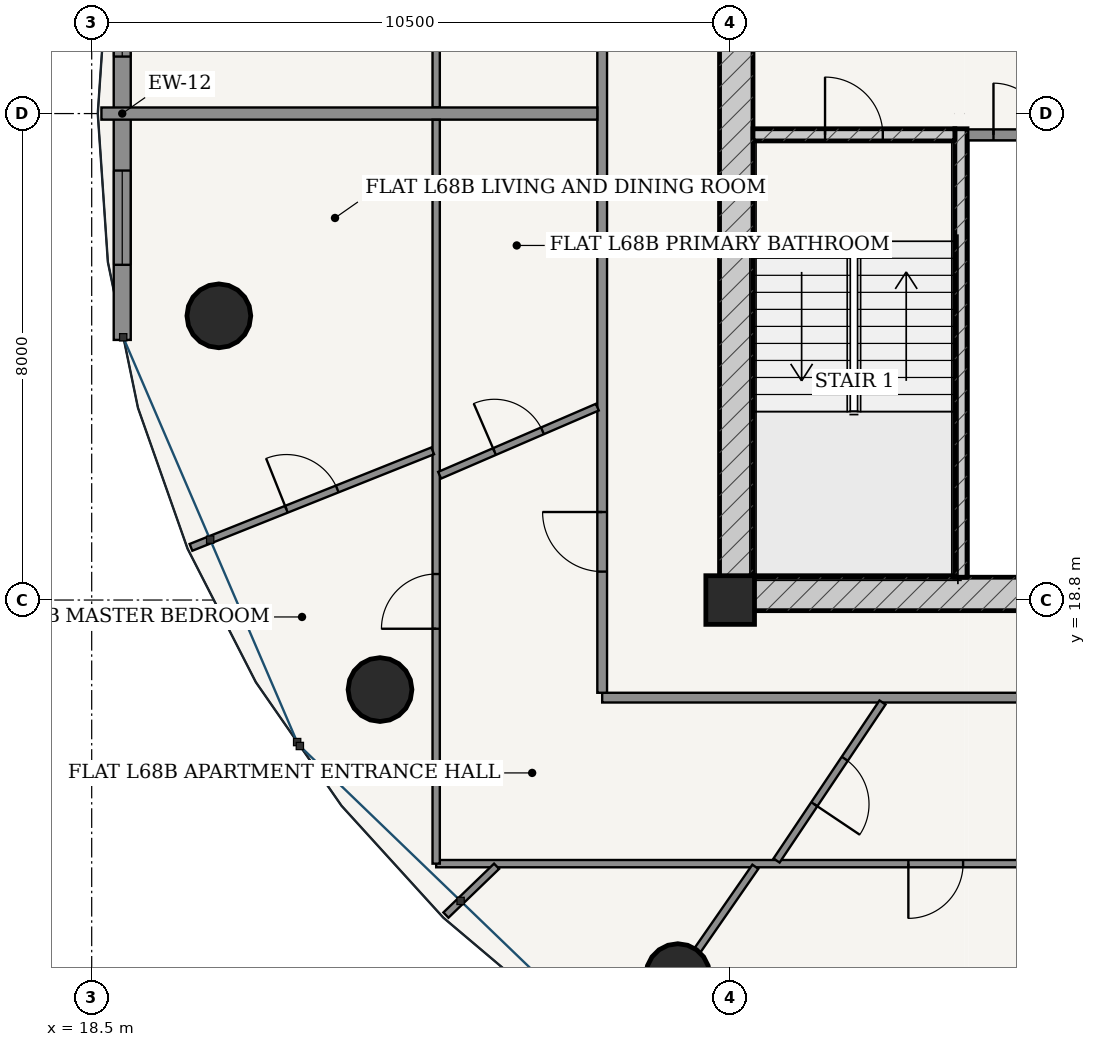
"""IFC4 building model, lengths in metres.
Left out: names, types, materials, properties, quantities, classifications, styles, units other than length and angle.
Written with IfcOpenShell. Run it as: python <this file> out.ifc"""

import sys

from ifc_helpers import new_model, si_unit, direction, frame, frame_2d, origin, origin_2d, place, context, subcontext, project, spatial, rectangle, hollow_circle, extrude, source, transform, mapped, element, fill, save


model = new_model("IFC4")
c1 = context("Model", 3, precision=1e-05, world=origin(), true_north=direction((-0.2419218956, 0.970295726276)))
c2 = subcontext(c1, "Body", "Model", "MODEL_VIEW")
j1 = project(units=[si_unit("LENGTHUNIT", "METRE"), si_unit("PLANEANGLEUNIT", "RADIAN")], contexts=[c1])
p1 = place(None, origin())
s1 = spatial("IfcSite", under=j1, at=p1, CompositionType="ELEMENT")
p2 = place(p1, origin())
s2 = spatial("IfcBuilding", under=s1, at=p2, CompositionType="ELEMENT")
p3 = place(p2, frame((0.0, 0.0, 259.45)))
s3 = spatial("IfcBuildingStorey", under=s2, at=p3, CompositionType="ELEMENT", Elevation=259.45)
p4 = place(p3, frame((29.0, 18.8, 0.0), z_axis=(0.0, 0.0, 1.0), x_axis=(1.0, 0.0, 0.0)))
e1 = element("IfcColumn", 1, at=p4, inside=s3, PredefinedType="COLUMN", context=c2, shape_type="SweptSolid", body=[
    extrude(rectangle(XDim=0.8, YDim=0.8, at=origin_2d()), origin(), (0.0, 0.0, 1.0), 3.75),
])
p5 = place(p3, frame((28.825, 18.9, 0.0), z_axis=(0.0, 0.0, 1.0), x_axis=(1.0, 0.0, 0.0)))
e2 = element("IfcWall", 2, at=p5, inside=s3, PredefinedType="SHEAR", context=c2, shape_type="SweptSolid", body=[
    extrude(rectangle(XDim=18.35, YDim=0.55, at=frame_2d((9.175, 0.0))), origin(), (0.0, 0.0, 1.0), 3.49),
])
p6 = place(p5, frame((8.75, 0.0, 0.0)))
e3 = element("IfcOpeningElement", 3, at=p6, cuts=e2, PredefinedType="OPENING", context=c2, shape_type="SweptSolid", body=[
    extrude(rectangle(XDim=0.85, YDim=2.1, at=frame_2d((0.425, 1.05))), frame((0.0, 0.285, 0.0), z_axis=(0.0, -1.0, 0.0), x_axis=(1.0, 0.0, 0.0)), (0.0, 0.0, 1.0), 0.57),
])
p7 = place(p3, frame((29.1, 19.175, 0.0), z_axis=(0.0, 0.0, 1.0), x_axis=(0.0, 1.0, 0.0)))
e4 = element("IfcWall", 4, at=p7, inside=s3, PredefinedType="SHEAR", context=c2, shape_type="SweptSolid", body=[
    extrude(rectangle(XDim=15.25, YDim=0.55, at=frame_2d((7.625, 0.0))), origin(), (0.0, 0.0, 1.0), 3.49),
])
p8 = place(p7, frame((9.875, 0.0, 0.0)))
e5 = element("IfcOpeningElement", 5, at=p8, cuts=e4, PredefinedType="OPENING", context=c2, shape_type="SweptSolid", body=[
    extrude(rectangle(XDim=1.5, YDim=2.2, at=frame_2d((0.75, 1.1))), frame((0.0, 0.285, 0.0), z_axis=(0.0, -1.0, 0.0), x_axis=(1.0, 0.0, 0.0)), (0.0, 0.0, 1.0), 0.57),
])
p9 = place(p3, frame((32.795, 19.175, 0.0), z_axis=(0.0, 0.0, 1.0), x_axis=(0.0, 1.0, 0.0)))
e6 = element("IfcWall", 6, at=p9, inside=s3, PredefinedType="SOLIDWALL", context=c2, shape_type="SweptSolid", body=[
    extrude(rectangle(XDim=7.375, YDim=0.2, at=frame_2d((3.688, 0.0))), origin(), (0.0, 0.0, 1.0), 3.49),
])
p10 = place(p3, frame((29.375, 26.45, 0.0), z_axis=(0.0, 0.0, 1.0), x_axis=(1.0, 0.0, 0.0)))
e7 = element("IfcWall", 7, at=p10, inside=s3, PredefinedType="SOLIDWALL", context=c2, shape_type="SweptSolid", body=[
    extrude(rectangle(XDim=3.32, YDim=0.2, at=frame_2d((1.66, 0.0))), origin(), (0.0, 0.0, 1.0), 3.49),
])
p11 = place(p10, frame((1.185, 0.0, 0.0)))
e8 = element("IfcOpeningElement", 8, at=p11, cuts=e7, PredefinedType="OPENING", context=c2, shape_type="SweptSolid", body=[
    extrude(rectangle(XDim=0.95, YDim=2.15, at=frame_2d((0.475, 1.075))), frame((0.0, 0.11, 0.0), z_axis=(0.0, -1.0, 0.0), x_axis=(1.0, 0.0, 0.0)), (0.0, 0.0, 1.0), 0.22),
])
for number, where, z_axis, x_axis in (
    (9, (20.591, 23.474, 0.0), (0.0, 0.0, 1.0), (1.0, 0.0, 0.0)),
    (10, (23.241, 17.328, 0.0), (0.0, 0.0, 1.0), (1.0, 0.0, 0.0)),
    (11, (28.139, 12.624, 0.0), (0.0, 0.0, 1.0), (1.0, 0.0, 0.0)),
):
    element("IfcColumn", number, at=place(p3, frame(where, z_axis=z_axis, x_axis=x_axis)), inside=s3, PredefinedType="COLUMN", context=c2, shape_type="SweptSolid", body=[
        extrude(hollow_circle(Radius=0.525, WallThickness=0.035, at=origin_2d()), origin(), (0.0, 0.0, 1.0), 3.75),
    ])
p12 = place(p3, frame((19.002, 30.522, 0.0), z_axis=(0.0, 0.0, 1.0), x_axis=(0.0, -1.0, 0.0)))
e12 = element("IfcWall", 12, at=p12, inside=s3, PredefinedType="SOLIDWALL", context=c2, shape_type="SweptSolid", body=[
    extrude(rectangle(XDim=7.445, YDim=0.28, at=frame_2d((3.722, 0.0))), origin(), (0.0, 0.0, 1.0), 3.49),
])
p13 = place(p12, frame((1.235, 0.0, 0.85)))
e13 = element("IfcOpeningElement", 13, at=p13, cuts=e12, PredefinedType="OPENING", context=c2, shape_type="SweptSolid", body=[
    extrude(rectangle(XDim=1.55, YDim=1.95, at=frame_2d((0.775, 0.975))), frame((0.0, 0.15, 0.0), z_axis=(0.0, -1.0, 0.0), x_axis=(1.0, 0.0, 0.0)), (0.0, 0.0, 1.0), 0.3),
])
p14 = place(p12, frame((4.66, 0.0, 0.85)))
e14 = element("IfcOpeningElement", 14, at=p14, cuts=e12, PredefinedType="OPENING", context=c2, shape_type="SweptSolid", body=[
    extrude(rectangle(XDim=1.55, YDim=1.95, at=frame_2d((0.775, 0.975))), frame((0.0, 0.15, 0.0), z_axis=(0.0, -1.0, 0.0), x_axis=(1.0, 0.0, 0.0)), (0.0, 0.0, 1.0), 0.3),
])
p15 = place(p3, frame((32.9, 26.45, 0.0), z_axis=(0.0, 0.0, 1.0), x_axis=(1.0, 0.0, 0.0)))
e15 = element("IfcWall", 15, at=p15, inside=s3, PredefinedType="PARTITIONING", context=c2, shape_type="SweptSolid", body=[
    extrude(rectangle(XDim=1.71, YDim=0.18, at=frame_2d((0.855, 0.0))), origin(), (0.0, 0.0, 1.0), 3.49),
])
p16 = place(p15, frame((0.43, 0.0, 0.0)))
e16 = element("IfcOpeningElement", 16, at=p16, cuts=e15, PredefinedType="OPENING", context=c2, shape_type="SweptSolid", body=[
    extrude(rectangle(XDim=0.85, YDim=2.1, at=frame_2d((0.425, 1.05))), frame((0.0, 0.1, 0.0), z_axis=(0.0, -1.0, 0.0), x_axis=(1.0, 0.0, 0.0)), (0.0, 0.0, 1.0), 0.2),
])
p17 = place(p3, frame((26.895, 17.195, 0.0), z_axis=(0.0, 0.0, 1.0), x_axis=(1.0, 0.0, 0.0)))
e17 = element("IfcWall", 17, at=p17, inside=s3, PredefinedType="PARTITIONING", context=c2, shape_type="SweptSolid", body=[
    extrude(rectangle(XDim=22.21, YDim=0.16, at=frame_2d((11.105, 0.0))), origin(), (0.0, 0.0, 1.0), 3.015),
])
p18 = place(p3, frame((26.895, 17.275, 0.0), z_axis=(0.0, 0.0, 1.0), x_axis=(0.0, 1.0, 0.0)))
e18 = element("IfcWall", 18, at=p18, inside=s3, PredefinedType="PARTITIONING", context=c2, shape_type="SweptSolid", body=[
    extrude(rectangle(XDim=13.925, YDim=0.16, at=frame_2d((6.962, 0.0))), origin(), (0.0, 0.0, 1.0), 3.015),
])
p19 = place(p18, frame((1.992, 0.0, 0.0)))
e19 = element("IfcOpeningElement", 19, at=p19, cuts=e18, PredefinedType="OPENING", context=c2, shape_type="SweptSolid", body=[
    extrude(rectangle(XDim=0.98, YDim=2.2, at=frame_2d((0.49, 1.1))), frame((0.0, 0.09, 0.0), z_axis=(0.0, -1.0, 0.0), x_axis=(1.0, 0.0, 0.0)), (0.0, 0.0, 1.0), 0.18),
])
p20 = place(p3, frame((24.165, 26.902, 0.0), z_axis=(0.0, 0.0, 1.0), x_axis=(0.0, 1.0, 0.0)))
e20 = element("IfcWall", 20, at=p20, inside=s3, PredefinedType="PARTITIONING", context=c2, shape_type="SweptSolid", body=[
    extrude(rectangle(XDim=7.108, YDim=0.12, at=frame_2d((3.554, 0.0))), origin(), (0.0, 0.0, 1.0), 3.015),
])
p21 = place(p3, frame((26.815, 26.8, 0.0), z_axis=(0.0, 0.0, 1.0), x_axis=(-1.0, 0.0, 0.0)))
e21 = element("IfcWall", 21, at=p21, inside=s3, PredefinedType="PARTITIONING", context=c2, shape_type="SweptSolid", body=[
    extrude(rectangle(XDim=8.155, YDim=0.2, at=frame_2d((4.078, 0.0))), origin(), (0.0, 0.0, 1.0), 3.121),
])
p22 = place(p3, frame((35.353, 14.465, 0.0), z_axis=(0.0, 0.0, 1.0), x_axis=(-1.0, 0.0, 0.0)))
e22 = element("IfcWall", 22, at=p22, inside=s3, PredefinedType="PARTITIONING", context=c2, shape_type="SweptSolid", body=[
    extrude(rectangle(XDim=11.188, YDim=0.12, at=frame_2d((5.594, 0.0))), origin(), (0.0, 0.0, 1.0), 3.015),
])
p23 = place(p22, frame((2.522, 0.0, 0.0)))
e23 = element("IfcOpeningElement", 23, at=p23, cuts=e22, PredefinedType="OPENING", context=c2, shape_type="SweptSolid", body=[
    extrude(rectangle(XDim=0.9, YDim=2.15, at=frame_2d((0.45, 1.075))), frame((0.0, 0.07, 0.0), z_axis=(0.0, -1.0, 0.0), x_axis=(1.0, 0.0, 0.0)), (0.0, 0.0, 1.0), 0.14),
])
p24 = place(p3, frame((24.165, 14.465, 0.0), z_axis=(0.0, 0.0, 1.0), x_axis=(0.0, 1.0, 0.0)))
e24 = element("IfcWall", 24, at=p24, inside=s3, PredefinedType="PARTITIONING", context=c2, shape_type="SweptSolid", body=[
    extrude(rectangle(XDim=12.233, YDim=0.12, at=frame_2d((6.116, 0.0))), origin(), (0.0, 0.0, 1.0), 3.015),
])
p25 = place(p24, frame((3.863, 0.0, 0.0)))
e25 = element("IfcOpeningElement", 25, at=p25, cuts=e24, PredefinedType="OPENING", context=c2, shape_type="SweptSolid", body=[
    extrude(rectangle(XDim=0.9, YDim=2.15, at=frame_2d((0.45, 1.075))), frame((0.0, 0.07, 0.0), z_axis=(0.0, -1.0, 0.0), x_axis=(1.0, 0.0, 0.0)), (0.0, 0.0, 1.0), 0.14),
])
p26 = place(p3, frame((24.107, 21.253, 0.0), z_axis=(0.0, 0.0, 1.0), x_axis=(-0.928712556691, -0.370800467966, 0.0)))
e26 = element("IfcWall", 26, at=p26, inside=s3, PredefinedType="PARTITIONING", context=c2, shape_type="SweptSolid", body=[
    extrude(rectangle(XDim=4.28, YDim=0.12, at=frame_2d((2.14, 0.0))), origin(), (0.0, 0.0, 1.0), 3.121),
])
p27 = place(p26, frame((1.69, 0.0, 0.0)))
e27 = element("IfcOpeningElement", 27, at=p27, cuts=e26, PredefinedType="OPENING", context=c2, shape_type="SweptSolid", body=[
    extrude(rectangle(XDim=0.9, YDim=2.15, at=frame_2d((0.45, 1.075))), frame((0.0, 0.07, 0.0), z_axis=(0.0, -1.0, 0.0), x_axis=(1.0, 0.0, 0.0)), (0.0, 0.0, 1.0), 0.14),
])
p28 = place(p3, frame((25.159, 14.422, 0.0), z_axis=(0.0, 0.0, 1.0), x_axis=(-0.720070222664, -0.693901199331, 0.0)))
e28 = element("IfcWall", 28, at=p28, inside=s3, PredefinedType="PARTITIONING", context=c2, shape_type="SweptSolid", body=[
    extrude(rectangle(XDim=1.157, YDim=0.12, at=frame_2d((0.578, 0.0))), origin(), (0.0, 0.0, 1.0), 3.49),
])
p29 = place(p3, frame((29.414, 14.414, 0.0), z_axis=(0.0, 0.0, 1.0), x_axis=(-0.569657021681, -0.821882520589, 0.0)))
e29 = element("IfcWall", 29, at=p29, inside=s3, PredefinedType="PARTITIONING", context=c2, shape_type="SweptSolid", body=[
    extrude(rectangle(XDim=3.748, YDim=0.12, at=frame_2d((1.874, 0.0))), origin(), (0.0, 0.0, 1.0), 3.015),
])
p30 = place(p3, frame((26.815, 21.972, 0.0), z_axis=(0.0, 0.0, 1.0), x_axis=(-0.918135987469, -0.396265452082, 0.0)))
e30 = element("IfcWall", 30, at=p30, inside=s3, PredefinedType="PARTITIONING", context=c2, shape_type="SweptSolid", body=[
    extrude(rectangle(XDim=2.824, YDim=0.12, at=frame_2d((1.412, 0.0))), origin(), (0.0, 0.0, 1.0), 3.209),
])
p31 = place(p30, frame((0.982, 0.0, 0.0)))
e31 = element("IfcOpeningElement", 31, at=p31, cuts=e30, PredefinedType="OPENING", context=c2, shape_type="SweptSolid", body=[
    extrude(rectangle(XDim=0.86, YDim=2.15, at=frame_2d((0.43, 1.075))), frame((0.0, 0.07, 0.0), z_axis=(0.0, -1.0, 0.0), x_axis=(1.0, 0.0, 0.0)), (0.0, 0.0, 1.0), 0.14),
])
p32 = place(p3, frame((31.505, 17.115, 0.0), z_axis=(0.0, 0.0, 1.0), x_axis=(-0.557003057019, -0.83051044212, 0.0)))
e32 = element("IfcWall", 32, at=p32, inside=s3, PredefinedType="PARTITIONING", context=c2, shape_type="SweptSolid", body=[
    extrude(rectangle(XDim=3.129, YDim=0.12, at=frame_2d((1.564, 0.0))), origin(), (0.0, 0.0, 1.0), 3.209),
])
p33 = place(p32, frame((1.114, 0.0, 0.0)))
e33 = element("IfcOpeningElement", 33, at=p33, cuts=e32, PredefinedType="OPENING", context=c2, shape_type="SweptSolid", body=[
    extrude(rectangle(XDim=0.9, YDim=2.15, at=frame_2d((0.45, 1.075))), frame((0.0, 0.07, 0.0), z_axis=(0.0, -1.0, 0.0), x_axis=(1.0, 0.0, 0.0)), (0.0, 0.0, 1.0), 0.14),
])
m1 = source(origin(), c2, "Body", "SweptSolid", [
    extrude(rectangle(XDim=1.55, YDim=1.95, at=frame_2d((0.775, 0.975))), frame((0.0, 0.03, 0.0), z_axis=(0.0, -1.0, 0.0), x_axis=(1.0, 0.0, 0.0)), (0.0, 0.0, 1.0), 0.06),
])
p34 = place(p13, origin())
e34 = element("IfcWindow", 34, at=p34, inside=s3, PartitioningType="SINGLE_PANEL", PredefinedType="WINDOW", context=c2, shape_type="MappedRepresentation", body=[
    mapped(m1, transform((0.0, 0.0, 0.0), scale=1.0)),
])
fill(e13, e34)
p35 = place(p14, origin())
e35 = element("IfcWindow", 35, at=p35, inside=s3, PartitioningType="SINGLE_PANEL", PredefinedType="WINDOW", context=c2, shape_type="MappedRepresentation", body=[
    mapped(m1, transform((0.0, 0.0, 0.0), scale=1.0)),
])
fill(e14, e35)
m2 = source(origin(), c2, "Body", "SweptSolid", [
    extrude(rectangle(XDim=0.95, YDim=2.15, at=frame_2d((0.475, 1.075))), frame((0.0, 0.025, 0.0), z_axis=(0.0, -1.0, 0.0), x_axis=(1.0, 0.0, 0.0)), (0.0, 0.0, 1.0), 0.05),
])
p36 = place(p11, origin())
e36 = element("IfcDoor", 36, at=p36, inside=s3, OperationType="SINGLE_SWING_LEFT", PredefinedType="DOOR", context=c2, shape_type="MappedRepresentation", body=[
    mapped(m2, transform((0.0, 0.0, 0.0), scale=1.0)),
])
fill(e8, e36)
m3 = source(origin(), c2, "Body", "SweptSolid", [
    extrude(rectangle(XDim=0.85, YDim=2.1, at=frame_2d((0.425, 1.05))), frame((0.0, 0.025, 0.0), z_axis=(0.0, -1.0, 0.0), x_axis=(1.0, 0.0, 0.0)), (0.0, 0.0, 1.0), 0.05),
])
p37 = place(p16, origin())
e37 = element("IfcDoor", 37, at=p37, inside=s3, OperationType="SINGLE_SWING_LEFT", PredefinedType="DOOR", context=c2, shape_type="MappedRepresentation", body=[
    mapped(m3, transform((0.0, 0.0, 0.0), scale=1.0)),
])
fill(e16, e37)
m4 = source(origin(), c2, "Body", "SweptSolid", [
    extrude(rectangle(XDim=0.98, YDim=2.2, at=frame_2d((0.49, 1.1))), frame((0.0, 0.025, 0.0), z_axis=(0.0, -1.0, 0.0), x_axis=(1.0, 0.0, 0.0)), (0.0, 0.0, 1.0), 0.05),
])
p38 = place(p19, origin())
e38 = element("IfcDoor", 38, at=p38, inside=s3, OperationType="SINGLE_SWING_RIGHT", PredefinedType="DOOR", context=c2, shape_type="MappedRepresentation", body=[
    mapped(m4, transform((0.0, 0.0, 0.0), scale=1.0)),
])
fill(e19, e38)
m5 = source(origin(), c2, "Body", "SweptSolid", [
    extrude(rectangle(XDim=0.86, YDim=2.15, at=frame_2d((0.43, 1.075))), frame((0.0, 0.025, 0.0), z_axis=(0.0, -1.0, 0.0), x_axis=(1.0, 0.0, 0.0)), (0.0, 0.0, 1.0), 0.05),
])
p39 = place(p31, frame((0.86, 0.0, 0.0), z_axis=(0.0, 0.0, 1.0), x_axis=(-1.0, 0.0, 0.0)))
e39 = element("IfcDoor", 39, at=p39, inside=s3, OperationType="SINGLE_SWING_LEFT", PredefinedType="DOOR", context=c2, shape_type="MappedRepresentation", body=[
    mapped(m5, transform((0.0, 0.0, 0.0), scale=1.0)),
])
fill(e31, e39)
m6 = source(origin(), c2, "Body", "SweptSolid", [
    extrude(rectangle(XDim=0.9, YDim=2.15, at=frame_2d((0.45, 1.075))), frame((0.0, 0.025, 0.0), z_axis=(0.0, -1.0, 0.0), x_axis=(1.0, 0.0, 0.0)), (0.0, 0.0, 1.0), 0.05),
])
p40 = place(p33, origin())
e40 = element("IfcDoor", 40, at=p40, inside=s3, OperationType="SINGLE_SWING_RIGHT", PredefinedType="DOOR", context=c2, shape_type="MappedRepresentation", body=[
    mapped(m6, transform((0.0, 0.0, 0.0), scale=1.0)),
])
fill(e33, e40)
p41 = place(p25, origin())
e41 = element("IfcDoor", 41, at=p41, inside=s3, OperationType="SINGLE_SWING_LEFT", PredefinedType="DOOR", context=c2, shape_type="MappedRepresentation", body=[
    mapped(m6, transform((0.0, 0.0, 0.0), scale=1.0)),
])
fill(e25, e41)
p42 = place(p23, origin())
e42 = element("IfcDoor", 42, at=p42, inside=s3, OperationType="SINGLE_SWING_RIGHT", PredefinedType="DOOR", context=c2, shape_type="MappedRepresentation", body=[
    mapped(m6, transform((0.0, 0.0, 0.0), scale=1.0)),
])
fill(e23, e42)
p43 = place(p27, frame((0.9, 0.0, 0.0), z_axis=(0.0, 0.0, 1.0), x_axis=(-1.0, 0.0, 0.0)))
e43 = element("IfcDoor", 43, at=p43, inside=s3, OperationType="SINGLE_SWING_LEFT", PredefinedType="DOOR", context=c2, shape_type="MappedRepresentation", body=[
    mapped(m6, transform((0.0, 0.0, 0.0), scale=1.0)),
])
fill(e27, e43)
save(model, sys.argv[1])
